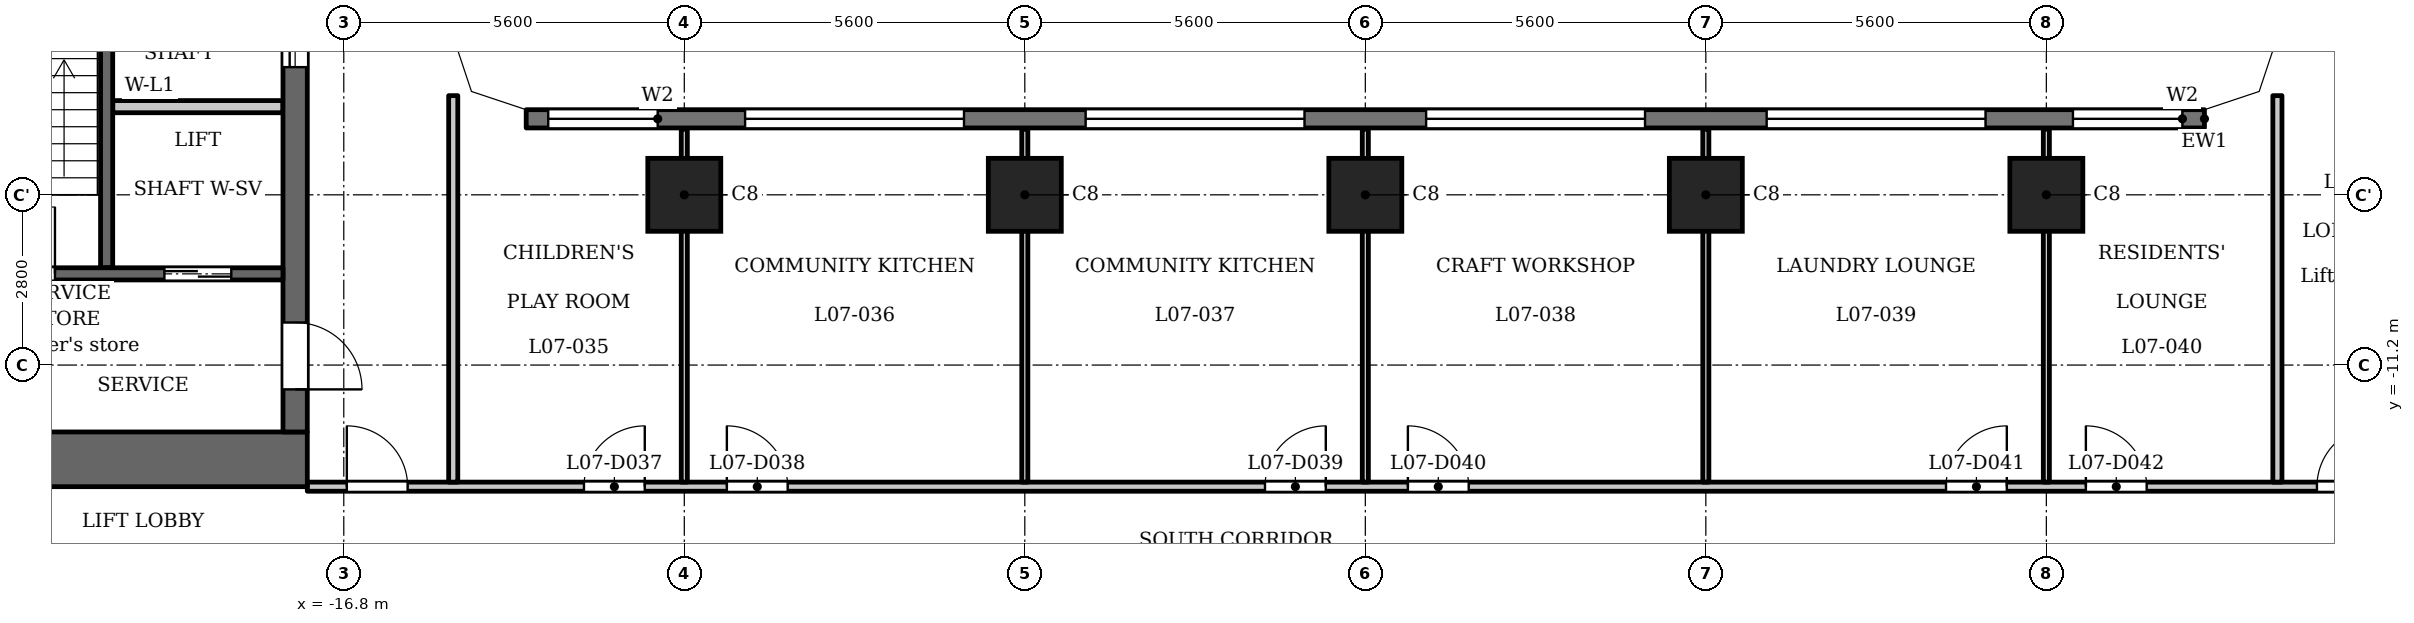
"""IFC4 building model, lengths in metres.
Left out: names, types, materials, properties, quantities, classifications, styles, units other than length and angle.
Written with IfcOpenShell. Run it as: python <this file> out.ifc"""

import sys

from ifc_helpers import new_model, si_unit, direction, frame, frame_2d, origin, origin_2d, place, context, subcontext, project, spatial, polyline, rectangle, outline, extrude, element, fill, save


model = new_model("IFC4")
c1 = context("Model", 3, precision=1e-05, world=origin(), true_north=direction((0.0, 1.0)))
c2 = subcontext(c1, "Body", "Model", "MODEL_VIEW")
j1 = project(units=[si_unit("LENGTHUNIT", "METRE"), si_unit("PLANEANGLEUNIT", "RADIAN")], contexts=[c1])
p1 = place(None, origin())
s1 = spatial("IfcSite", under=j1, at=p1, CompositionType="ELEMENT")
p2 = place(p1, origin())
s2 = spatial("IfcBuilding", under=s1, at=p2, CompositionType="ELEMENT")
p3 = place(p2, frame((0.0, 0.0, 34.0)))
s3 = spatial("IfcBuildingStorey", under=s2, at=p3, CompositionType="ELEMENT", Elevation=34.0)
for number, where, z_axis, x_axis in (
    (1, (-11.2, -8.4, 0.0), (0.0, 0.0, 1.0), (1.0, 0.0, 0.0)),
    (2, (-5.6, -8.4, 0.0), (0.0, 0.0, 1.0), (1.0, 0.0, 0.0)),
    (3, (0.0, -8.4, 0.0), (0.0, 0.0, 1.0), (1.0, 0.0, 0.0)),
    (4, (5.6, -8.4, 0.0), (0.0, 0.0, 1.0), (1.0, 0.0, 0.0)),
    (5, (11.2, -8.4, 0.0), (0.0, 0.0, 1.0), (1.0, 0.0, 0.0)),
):
    element("IfcColumn", number, at=place(p3, frame(where, z_axis=z_axis, x_axis=x_axis)), inside=s3, PredefinedType="COLUMN", context=c2, shape_type="SweptSolid", body=[
        extrude(rectangle(XDim=1.2, YDim=1.2, at=origin_2d()), origin(), (0.0, 0.0, 1.0), 3.5),
    ])
p4 = place(p3, frame((13.8, -7.15, 0.0), z_axis=(0.0, 0.0, 1.0), x_axis=(-1.0, 0.0, 0.0)))
e6 = element("IfcWall", 6, at=p4, inside=s3, PredefinedType="SOLIDWALL", context=c2, shape_type="SweptSolid", body=[
    extrude(rectangle(XDim=27.6, YDim=0.3, at=frame_2d((13.8, 0.0))), origin(), (0.0, 0.0, 1.0), 3.2),
])
p5 = place(p4, frame((0.363, 0.0, 0.9)))
e7 = element("IfcOpeningElement", 7, at=p5, cuts=e6, PredefinedType="OPENING", context=c2, shape_type="SweptSolid", body=[
    extrude(rectangle(XDim=1.8, YDim=1.25, at=frame_2d((0.9, 0.625))), frame((0.0, 0.16, 0.0), z_axis=(0.0, -1.0, 0.0), x_axis=(1.0, 0.0, 0.0)), (0.0, 0.0, 1.0), 0.32),
])
p6 = place(p4, frame((3.6, 0.0, 1.2)))
e8 = element("IfcOpeningElement", 8, at=p6, cuts=e6, PredefinedType="OPENING", context=c2, shape_type="SweptSolid", body=[
    extrude(rectangle(XDim=3.6, YDim=0.95, at=frame_2d((1.8, 0.475))), frame((0.0, 0.16, 0.0), z_axis=(0.0, -1.0, 0.0), x_axis=(1.0, 0.0, 0.0)), (0.0, 0.0, 1.0), 0.32),
])
p7 = place(p4, frame((9.2, 0.0, 1.2)))
e9 = element("IfcOpeningElement", 9, at=p7, cuts=e6, PredefinedType="OPENING", context=c2, shape_type="SweptSolid", body=[
    extrude(rectangle(XDim=3.6, YDim=0.95, at=frame_2d((1.8, 0.475))), frame((0.0, 0.16, 0.0), z_axis=(0.0, -1.0, 0.0), x_axis=(1.0, 0.0, 0.0)), (0.0, 0.0, 1.0), 0.32),
])
p8 = place(p4, frame((14.8, 0.0, 1.2)))
e10 = element("IfcOpeningElement", 10, at=p8, cuts=e6, PredefinedType="OPENING", context=c2, shape_type="SweptSolid", body=[
    extrude(rectangle(XDim=3.6, YDim=0.95, at=frame_2d((1.8, 0.475))), frame((0.0, 0.16, 0.0), z_axis=(0.0, -1.0, 0.0), x_axis=(1.0, 0.0, 0.0)), (0.0, 0.0, 1.0), 0.32),
])
p9 = place(p4, frame((20.4, 0.0, 1.2)))
e11 = element("IfcOpeningElement", 11, at=p9, cuts=e6, PredefinedType="OPENING", context=c2, shape_type="SweptSolid", body=[
    extrude(rectangle(XDim=3.6, YDim=0.95, at=frame_2d((1.8, 0.475))), frame((0.0, 0.16, 0.0), z_axis=(0.0, -1.0, 0.0), x_axis=(1.0, 0.0, 0.0)), (0.0, 0.0, 1.0), 0.32),
])
p10 = place(p4, frame((25.438, 0.0, 0.9)))
e12 = element("IfcOpeningElement", 12, at=p10, cuts=e6, PredefinedType="OPENING", context=c2, shape_type="SweptSolid", body=[
    extrude(rectangle(XDim=1.8, YDim=1.25, at=frame_2d((0.9, 0.625))), frame((0.0, 0.16, 0.0), z_axis=(0.0, -1.0, 0.0), x_axis=(1.0, 0.0, 0.0)), (0.0, 0.0, 1.0), 0.32),
])
p11 = place(p3, frame((-20.7, -9.6, 0.0), z_axis=(0.0, 0.0, 1.0), x_axis=(0.0, 1.0, 0.0)))
e13 = element("IfcWall", 13, at=p11, inside=s3, PredefinedType="SHEAR", context=c2, shape_type="SweptSolid", body=[
    extrude(rectangle(XDim=9.75, YDim=0.2, at=frame_2d((4.875, 0.0))), origin(), (0.0, 0.0, 1.0), 3.2),
])
p12 = place(p3, frame((-17.4, -12.75, 0.0), z_axis=(0.0, 0.0, 1.0), x_axis=(-1.0, 0.0, 0.0)))
e14 = element("IfcWall", 14, at=p12, inside=s3, PredefinedType="SHEAR", context=c2, shape_type="SweptSolid", body=[
    extrude(rectangle(XDim=10.4, YDim=0.9, at=frame_2d((5.2, 0.0))), origin(), (0.0, 0.0, 1.0), 3.2),
])
p13 = place(p3, frame((-17.6, -12.3, 0.0), z_axis=(0.0, 0.0, 1.0), x_axis=(0.0, 1.0, 0.0)))
e15 = element("IfcWall", 15, at=p13, inside=s3, PredefinedType="SHEAR", context=c2, shape_type="SweptSolid", body=[
    extrude(rectangle(XDim=24.6, YDim=0.4, at=frame_2d((12.3, 0.0))), origin(), (0.0, 0.0, 1.0), 3.2),
])
p14 = place(p13, frame((6.0, 0.0, 0.0)))
e16 = element("IfcOpeningElement", 16, at=p14, cuts=e15, PredefinedType="OPENING", context=c2, shape_type="SweptSolid", body=[
    extrude(rectangle(XDim=1.1, YDim=2.1, at=frame_2d((0.55, 1.05))), frame((0.0, 0.21, 0.0), z_axis=(0.0, -1.0, 0.0), x_axis=(1.0, 0.0, 0.0)), (0.0, 0.0, 1.0), 0.42),
])
p15 = place(p13, frame((8.4, 0.0, 0.0)))
e17 = element("IfcOpeningElement", 17, at=p15, cuts=e15, PredefinedType="OPENING", context=c2, shape_type="SweptSolid", body=[
    extrude(rectangle(XDim=1.1, YDim=2.1, at=frame_2d((0.55, 1.05))), frame((0.0, 0.21, 0.0), z_axis=(0.0, -1.0, 0.0), x_axis=(1.0, 0.0, 0.0)), (0.0, 0.0, 1.0), 0.42),
])
p16 = place(p13, frame((10.8, 0.0, 0.0)))
e18 = element("IfcOpeningElement", 18, at=p16, cuts=e15, PredefinedType="OPENING", context=c2, shape_type="SweptSolid", body=[
    extrude(rectangle(XDim=1.1, YDim=2.1, at=frame_2d((0.55, 1.05))), frame((0.0, 0.21, 0.0), z_axis=(0.0, -1.0, 0.0), x_axis=(1.0, 0.0, 0.0)), (0.0, 0.0, 1.0), 0.42),
])
p17 = place(p13, frame((16.75, 0.0, 0.0)))
e19 = element("IfcOpeningElement", 19, at=p17, cuts=e15, PredefinedType="OPENING", context=c2, shape_type="SweptSolid", body=[
    extrude(rectangle(XDim=0.9, YDim=2.1, at=frame_2d((0.45, 1.05))), frame((0.0, 0.21, 0.0), z_axis=(0.0, -1.0, 0.0), x_axis=(1.0, 0.0, 0.0)), (0.0, 0.0, 1.0), 0.42),
])
p18 = place(p13, frame((22.8, 0.0, 0.0)))
e20 = element("IfcOpeningElement", 20, at=p18, cuts=e15, PredefinedType="OPENING", context=c2, shape_type="SweptSolid", body=[
    extrude(rectangle(XDim=1.1, YDim=2.1, at=frame_2d((0.55, 1.05))), frame((0.0, 0.21, 0.0), z_axis=(0.0, -1.0, 0.0), x_axis=(1.0, 0.0, 0.0)), (0.0, 0.0, 1.0), 0.42),
])
p19 = place(p13, frame((0.7, 0.0, 0.0)))
e21 = element("IfcOpeningElement", 21, at=p19, cuts=e15, PredefinedType="OPENING", context=c2, shape_type="SweptSolid", body=[
    extrude(rectangle(XDim=1.1, YDim=2.1, at=frame_2d((0.55, 1.05))), frame((0.0, 0.21, 0.0), z_axis=(0.0, -1.0, 0.0), x_axis=(1.0, 0.0, 0.0)), (0.0, 0.0, 1.0), 0.42),
])
p20 = place(p13, frame((12.775, 0.0, 0.0)))
e22 = element("IfcOpeningElement", 22, at=p20, cuts=e15, PredefinedType="OPENING", context=c2, shape_type="SweptSolid", body=[
    extrude(rectangle(XDim=1.8, YDim=2.1, at=frame_2d((0.9, 1.05))), frame((0.0, 0.21, 0.0), z_axis=(0.0, -1.0, 0.0), x_axis=(1.0, 0.0, 0.0)), (0.0, 0.0, 1.0), 0.42),
])
p21 = place(p3, frame((-17.8, -9.7, 0.0), z_axis=(0.0, 0.0, 1.0), x_axis=(-1.0, 0.0, 0.0)))
e23 = element("IfcWall", 23, at=p21, inside=s3, PredefinedType="SHEAR", context=c2, shape_type="SweptSolid", body=[
    extrude(rectangle(XDim=8.3, YDim=0.2, at=frame_2d((4.15, 0.0))), origin(), (0.0, 0.0, 1.0), 3.2),
])
p22 = place(p21, frame((0.85, 0.0, 0.0)))
e24 = element("IfcOpeningElement", 24, at=p22, cuts=e23, PredefinedType="OPENING", context=c2, shape_type="SweptSolid", body=[
    extrude(rectangle(XDim=1.1, YDim=2.1, at=frame_2d((0.55, 1.05))), frame((0.0, 0.11, 0.0), z_axis=(0.0, -1.0, 0.0), x_axis=(1.0, 0.0, 0.0)), (0.0, 0.0, 1.0), 0.22),
])
p23 = place(p21, frame((3.75, 0.0, 0.0)))
e25 = element("IfcOpeningElement", 25, at=p23, cuts=e23, PredefinedType="OPENING", context=c2, shape_type="SweptSolid", body=[
    extrude(rectangle(XDim=1.1, YDim=2.1, at=frame_2d((0.55, 1.05))), frame((0.0, 0.11, 0.0), z_axis=(0.0, -1.0, 0.0), x_axis=(1.0, 0.0, 0.0)), (0.0, 0.0, 1.0), 0.22),
])
p24 = place(p3, frame((-17.8, -6.95, 0.0), z_axis=(0.0, 0.0, 1.0), x_axis=(-1.0, 0.0, 0.0)))
e26 = element("IfcWall", 26, at=p24, inside=s3, PredefinedType="PARTITIONING", context=c2, shape_type="SweptSolid", body=[
    extrude(rectangle(XDim=2.8, YDim=0.2, at=frame_2d((1.4, 0.0))), origin(), (0.0, 0.0, 1.0), 3.2),
])
p25 = place(p3, frame((-17.4, -13.2, 0.0), z_axis=(0.0, 0.0, 1.0), x_axis=(1.0, 0.0, 0.0)))
e27 = element("IfcWall", 27, at=p25, inside=s3, PredefinedType="PARTITIONING", context=c2, shape_type="SweptSolid", body=[
    extrude(rectangle(XDim=34.8, YDim=0.15, at=frame_2d((17.4, 0.0))), origin(), (0.0, 0.0, 1.0), 3.2),
])
p26 = place(p25, frame((0.65, 0.0, 0.0)))
e28 = element("IfcOpeningElement", 28, at=p26, cuts=e27, PredefinedType="OPENING", context=c2, shape_type="SweptSolid", body=[
    extrude(rectangle(XDim=1.0, YDim=2.1, at=frame_2d((0.5, 1.05))), frame((0.0, 0.085, 0.0), z_axis=(0.0, -1.0, 0.0), x_axis=(1.0, 0.0, 0.0)), (0.0, 0.0, 1.0), 0.17),
])
p27 = place(p25, frame((33.05, 0.0, 0.0)))
e29 = element("IfcOpeningElement", 29, at=p27, cuts=e27, PredefinedType="OPENING", context=c2, shape_type="SweptSolid", body=[
    extrude(rectangle(XDim=1.0, YDim=2.1, at=frame_2d((0.5, 1.05))), frame((0.0, 0.085, 0.0), z_axis=(0.0, -1.0, 0.0), x_axis=(1.0, 0.0, 0.0)), (0.0, 0.0, 1.0), 0.17),
])
p28 = place(p25, frame((4.55, 0.0, 0.0)))
e30 = element("IfcOpeningElement", 30, at=p28, cuts=e27, PredefinedType="OPENING", context=c2, shape_type="SweptSolid", body=[
    extrude(rectangle(XDim=1.0, YDim=2.1, at=frame_2d((0.5, 1.05))), frame((0.0, 0.085, 0.0), z_axis=(0.0, -1.0, 0.0), x_axis=(1.0, 0.0, 0.0)), (0.0, 0.0, 1.0), 0.17),
])
p29 = place(p25, frame((6.9, 0.0, 0.0)))
e31 = element("IfcOpeningElement", 31, at=p29, cuts=e27, PredefinedType="OPENING", context=c2, shape_type="SweptSolid", body=[
    extrude(rectangle(XDim=1.0, YDim=2.1, at=frame_2d((0.5, 1.05))), frame((0.0, 0.085, 0.0), z_axis=(0.0, -1.0, 0.0), x_axis=(1.0, 0.0, 0.0)), (0.0, 0.0, 1.0), 0.17),
])
p30 = place(p25, frame((15.75, 0.0, 0.0)))
e32 = element("IfcOpeningElement", 32, at=p30, cuts=e27, PredefinedType="OPENING", context=c2, shape_type="SweptSolid", body=[
    extrude(rectangle(XDim=1.0, YDim=2.1, at=frame_2d((0.5, 1.05))), frame((0.0, 0.085, 0.0), z_axis=(0.0, -1.0, 0.0), x_axis=(1.0, 0.0, 0.0)), (0.0, 0.0, 1.0), 0.17),
])
p31 = place(p25, frame((18.1, 0.0, 0.0)))
e33 = element("IfcOpeningElement", 33, at=p31, cuts=e27, PredefinedType="OPENING", context=c2, shape_type="SweptSolid", body=[
    extrude(rectangle(XDim=1.0, YDim=2.1, at=frame_2d((0.5, 1.05))), frame((0.0, 0.085, 0.0), z_axis=(0.0, -1.0, 0.0), x_axis=(1.0, 0.0, 0.0)), (0.0, 0.0, 1.0), 0.17),
])
p32 = place(p25, frame((26.95, 0.0, 0.0)))
e34 = element("IfcOpeningElement", 34, at=p32, cuts=e27, PredefinedType="OPENING", context=c2, shape_type="SweptSolid", body=[
    extrude(rectangle(XDim=1.0, YDim=2.1, at=frame_2d((0.5, 1.05))), frame((0.0, 0.085, 0.0), z_axis=(0.0, -1.0, 0.0), x_axis=(1.0, 0.0, 0.0)), (0.0, 0.0, 1.0), 0.17),
])
p33 = place(p25, frame((29.25, 0.0, 0.0)))
e35 = element("IfcOpeningElement", 35, at=p33, cuts=e27, PredefinedType="OPENING", context=c2, shape_type="SweptSolid", body=[
    extrude(rectangle(XDim=1.0, YDim=2.1, at=frame_2d((0.5, 1.05))), frame((0.0, 0.085, 0.0), z_axis=(0.0, -1.0, 0.0), x_axis=(1.0, 0.0, 0.0)), (0.0, 0.0, 1.0), 0.17),
])
p34 = place(p3, frame((-15.0, -13.125, 0.0), z_axis=(0.0, 0.0, 1.0), x_axis=(0.0, 1.0, 0.0)))
e36 = element("IfcWall", 36, at=p34, inside=s3, PredefinedType="PARTITIONING", context=c2, shape_type="SweptSolid", body=[
    extrude(rectangle(XDim=6.356, YDim=0.15, at=frame_2d((3.178, 0.0))), origin(), (0.0, 0.0, 1.0), 3.2),
])
for number, where, z_axis, x_axis in (
    (37, (-11.2, -13.125, 0.0), (0.0, 0.0, 1.0), (0.0, 1.0, 0.0)),
    (38, (-5.6, -13.125, 0.0), (0.0, 0.0, 1.0), (0.0, 1.0, 0.0)),
    (39, (0.0, -13.125, 0.0), (0.0, 0.0, 1.0), (0.0, 1.0, 0.0)),
    (40, (5.6, -13.125, 0.0), (0.0, 0.0, 1.0), (0.0, 1.0, 0.0)),
    (41, (11.2, -13.125, 0.0), (0.0, 0.0, 1.0), (0.0, 1.0, 0.0)),
):
    element("IfcWall", number, at=place(p3, frame(where, z_axis=z_axis, x_axis=x_axis)), inside=s3, PredefinedType="PARTITIONING", context=c2, shape_type="SweptSolid", body=[
        extrude(rectangle(XDim=5.805, YDim=0.1, at=frame_2d((2.902, 0.0))), origin(), (0.0, 0.0, 1.0), 3.2),
    ])
p35 = place(p3, frame((15.0, -13.125, 0.0), z_axis=(0.0, 0.0, 1.0), x_axis=(0.0, 1.0, 0.0)))
e42 = element("IfcWall", 42, at=p35, inside=s3, PredefinedType="PARTITIONING", context=c2, shape_type="SweptSolid", body=[
    extrude(rectangle(XDim=6.356, YDim=0.15, at=frame_2d((3.178, 0.0))), origin(), (0.0, 0.0, 1.0), 3.2),
])
p36 = place(p3, origin())
e43 = element("IfcWall", 43, at=p36, inside=s3, PredefinedType="SOLIDWALL", context=c2, shape_type="SweptSolid", body=[
    extrude(outline(polyline([(14.937, -6.937), (15.3, -5.849), (15.3, -5.8), (15.0, -5.8), (14.7, -6.7), (13.8, -7.0), (13.8, -7.3), (13.849, -7.3), (14.937, -6.937)])), origin(), (0.0, 0.0, 1.0), 3.2),
])
e44 = element("IfcWall", 44, at=p36, inside=s3, PredefinedType="SOLIDWALL", context=c2, shape_type="SweptSolid", body=[
    extrude(outline(polyline([(-14.937, -6.937), (-13.849, -7.3), (-13.8, -7.3), (-13.8, -7.0), (-14.7, -6.7), (-15.0, -5.8), (-15.3, -5.8), (-15.3, -5.849), (-14.937, -6.937)])), origin(), (0.0, 0.0, 1.0), 3.2),
])
p37 = place(p22, origin())
e45 = element("IfcDoor", 45, at=p37, inside=s3, OperationType="DOUBLE_DOOR_SLIDING", PredefinedType="DOOR", context=c2, shape_type="SweptSolid", body=[
    extrude(rectangle(XDim=1.1, YDim=2.1, at=frame_2d((0.55, 1.05))), frame((0.0, 0.025, 0.0), z_axis=(0.0, -1.0, 0.0), x_axis=(1.0, 0.0, 0.0)), (0.0, 0.0, 1.0), 0.05),
])
fill(e24, e45)
p38 = place(p14, origin())
e46 = element("IfcDoor", 46, at=p38, inside=s3, OperationType="DOUBLE_DOOR_SLIDING", PredefinedType="DOOR", context=c2, shape_type="SweptSolid", body=[
    extrude(rectangle(XDim=1.1, YDim=2.1, at=frame_2d((0.55, 1.05))), frame((0.0, 0.025, 0.0), z_axis=(0.0, -1.0, 0.0), x_axis=(1.0, 0.0, 0.0)), (0.0, 0.0, 1.0), 0.05),
])
fill(e16, e46)
p39 = place(p19, origin())
e47 = element("IfcDoor", 47, at=p39, inside=s3, OperationType="SINGLE_SWING_LEFT", PredefinedType="DOOR", context=c2, shape_type="SweptSolid", body=[
    extrude(rectangle(XDim=1.1, YDim=2.1, at=frame_2d((0.55, 1.05))), frame((0.0, 0.025, 0.0), z_axis=(0.0, -1.0, 0.0), x_axis=(1.0, 0.0, 0.0)), (0.0, 0.0, 1.0), 0.05),
])
fill(e21, e47)
p40 = place(p23, origin())
e48 = element("IfcDoor", 48, at=p40, inside=s3, OperationType="SINGLE_SWING_LEFT", PredefinedType="DOOR", context=c2, shape_type="SweptSolid", body=[
    extrude(rectangle(XDim=1.1, YDim=2.1, at=frame_2d((0.55, 1.05))), frame((0.0, 0.025, 0.0), z_axis=(0.0, -1.0, 0.0), x_axis=(1.0, 0.0, 0.0)), (0.0, 0.0, 1.0), 0.05),
])
fill(e25, e48)
p41 = place(p26, origin())
e49 = element("IfcDoor", 49, at=p41, inside=s3, OperationType="SINGLE_SWING_RIGHT", PredefinedType="DOOR", context=c2, shape_type="SweptSolid", body=[
    extrude(rectangle(XDim=1.0, YDim=2.1, at=frame_2d((0.5, 1.05))), frame((0.0, 0.025, 0.0), z_axis=(0.0, -1.0, 0.0), x_axis=(1.0, 0.0, 0.0)), (0.0, 0.0, 1.0), 0.05),
])
fill(e28, e49)
p42 = place(p27, origin())
e50 = element("IfcDoor", 50, at=p42, inside=s3, OperationType="SINGLE_SWING_LEFT", PredefinedType="DOOR", context=c2, shape_type="SweptSolid", body=[
    extrude(rectangle(XDim=1.0, YDim=2.1, at=frame_2d((0.5, 1.05))), frame((0.0, 0.025, 0.0), z_axis=(0.0, -1.0, 0.0), x_axis=(1.0, 0.0, 0.0)), (0.0, 0.0, 1.0), 0.05),
])
fill(e29, e50)
p43 = place(p28, origin())
e51 = element("IfcDoor", 51, at=p43, inside=s3, OperationType="SINGLE_SWING_LEFT", PredefinedType="DOOR", context=c2, shape_type="SweptSolid", body=[
    extrude(rectangle(XDim=1.0, YDim=2.1, at=frame_2d((0.5, 1.05))), frame((0.0, 0.025, 0.0), z_axis=(0.0, -1.0, 0.0), x_axis=(1.0, 0.0, 0.0)), (0.0, 0.0, 1.0), 0.05),
])
fill(e30, e51)
p44 = place(p29, origin())
e52 = element("IfcDoor", 52, at=p44, inside=s3, OperationType="SINGLE_SWING_RIGHT", PredefinedType="DOOR", context=c2, shape_type="SweptSolid", body=[
    extrude(rectangle(XDim=1.0, YDim=2.1, at=frame_2d((0.5, 1.05))), frame((0.0, 0.025, 0.0), z_axis=(0.0, -1.0, 0.0), x_axis=(1.0, 0.0, 0.0)), (0.0, 0.0, 1.0), 0.05),
])
fill(e31, e52)
p45 = place(p30, origin())
e53 = element("IfcDoor", 53, at=p45, inside=s3, OperationType="SINGLE_SWING_LEFT", PredefinedType="DOOR", context=c2, shape_type="SweptSolid", body=[
    extrude(rectangle(XDim=1.0, YDim=2.1, at=frame_2d((0.5, 1.05))), frame((0.0, 0.025, 0.0), z_axis=(0.0, -1.0, 0.0), x_axis=(1.0, 0.0, 0.0)), (0.0, 0.0, 1.0), 0.05),
])
fill(e32, e53)
p46 = place(p31, origin())
e54 = element("IfcDoor", 54, at=p46, inside=s3, OperationType="SINGLE_SWING_RIGHT", PredefinedType="DOOR", context=c2, shape_type="SweptSolid", body=[
    extrude(rectangle(XDim=1.0, YDim=2.1, at=frame_2d((0.5, 1.05))), frame((0.0, 0.025, 0.0), z_axis=(0.0, -1.0, 0.0), x_axis=(1.0, 0.0, 0.0)), (0.0, 0.0, 1.0), 0.05),
])
fill(e33, e54)
p47 = place(p32, origin())
e55 = element("IfcDoor", 55, at=p47, inside=s3, OperationType="SINGLE_SWING_LEFT", PredefinedType="DOOR", context=c2, shape_type="SweptSolid", body=[
    extrude(rectangle(XDim=1.0, YDim=2.1, at=frame_2d((0.5, 1.05))), frame((0.0, 0.025, 0.0), z_axis=(0.0, -1.0, 0.0), x_axis=(1.0, 0.0, 0.0)), (0.0, 0.0, 1.0), 0.05),
])
fill(e34, e55)
p48 = place(p33, origin())
e56 = element("IfcDoor", 56, at=p48, inside=s3, OperationType="SINGLE_SWING_RIGHT", PredefinedType="DOOR", context=c2, shape_type="SweptSolid", body=[
    extrude(rectangle(XDim=1.0, YDim=2.1, at=frame_2d((0.5, 1.05))), frame((0.0, 0.025, 0.0), z_axis=(0.0, -1.0, 0.0), x_axis=(1.0, 0.0, 0.0)), (0.0, 0.0, 1.0), 0.05),
])
fill(e35, e56)
p49 = place(p5, origin())
e57 = element("IfcWindow", 57, at=p49, inside=s3, PartitioningType="SINGLE_PANEL", PredefinedType="WINDOW", context=c2, shape_type="SweptSolid", body=[
    extrude(rectangle(XDim=1.8, YDim=1.25, at=frame_2d((0.9, 0.625))), frame((0.0, 0.03, 0.0), z_axis=(0.0, -1.0, 0.0), x_axis=(1.0, 0.0, 0.0)), (0.0, 0.0, 1.0), 0.06),
])
fill(e7, e57)
p50 = place(p6, origin())
e58 = element("IfcWindow", 58, at=p50, inside=s3, PartitioningType="SINGLE_PANEL", PredefinedType="WINDOW", context=c2, shape_type="SweptSolid", body=[
    extrude(rectangle(XDim=3.6, YDim=0.95, at=frame_2d((1.8, 0.475))), frame((0.0, 0.03, 0.0), z_axis=(0.0, -1.0, 0.0), x_axis=(1.0, 0.0, 0.0)), (0.0, 0.0, 1.0), 0.06),
])
fill(e8, e58)
p51 = place(p7, origin())
e59 = element("IfcWindow", 59, at=p51, inside=s3, PartitioningType="SINGLE_PANEL", PredefinedType="WINDOW", context=c2, shape_type="SweptSolid", body=[
    extrude(rectangle(XDim=3.6, YDim=0.95, at=frame_2d((1.8, 0.475))), frame((0.0, 0.03, 0.0), z_axis=(0.0, -1.0, 0.0), x_axis=(1.0, 0.0, 0.0)), (0.0, 0.0, 1.0), 0.06),
])
fill(e9, e59)
p52 = place(p8, origin())
e60 = element("IfcWindow", 60, at=p52, inside=s3, PartitioningType="SINGLE_PANEL", PredefinedType="WINDOW", context=c2, shape_type="SweptSolid", body=[
    extrude(rectangle(XDim=3.6, YDim=0.95, at=frame_2d((1.8, 0.475))), frame((0.0, 0.03, 0.0), z_axis=(0.0, -1.0, 0.0), x_axis=(1.0, 0.0, 0.0)), (0.0, 0.0, 1.0), 0.06),
])
fill(e10, e60)
p53 = place(p9, origin())
e61 = element("IfcWindow", 61, at=p53, inside=s3, PartitioningType="SINGLE_PANEL", PredefinedType="WINDOW", context=c2, shape_type="SweptSolid", body=[
    extrude(rectangle(XDim=3.6, YDim=0.95, at=frame_2d((1.8, 0.475))), frame((0.0, 0.03, 0.0), z_axis=(0.0, -1.0, 0.0), x_axis=(1.0, 0.0, 0.0)), (0.0, 0.0, 1.0), 0.06),
])
fill(e11, e61)
p54 = place(p10, origin())
e62 = element("IfcWindow", 62, at=p54, inside=s3, PartitioningType="SINGLE_PANEL", PredefinedType="WINDOW", context=c2, shape_type="SweptSolid", body=[
    extrude(rectangle(XDim=1.8, YDim=1.25, at=frame_2d((0.9, 0.625))), frame((0.0, 0.03, 0.0), z_axis=(0.0, -1.0, 0.0), x_axis=(1.0, 0.0, 0.0)), (0.0, 0.0, 1.0), 0.06),
])
fill(e12, e62)
save(model, sys.argv[1])
